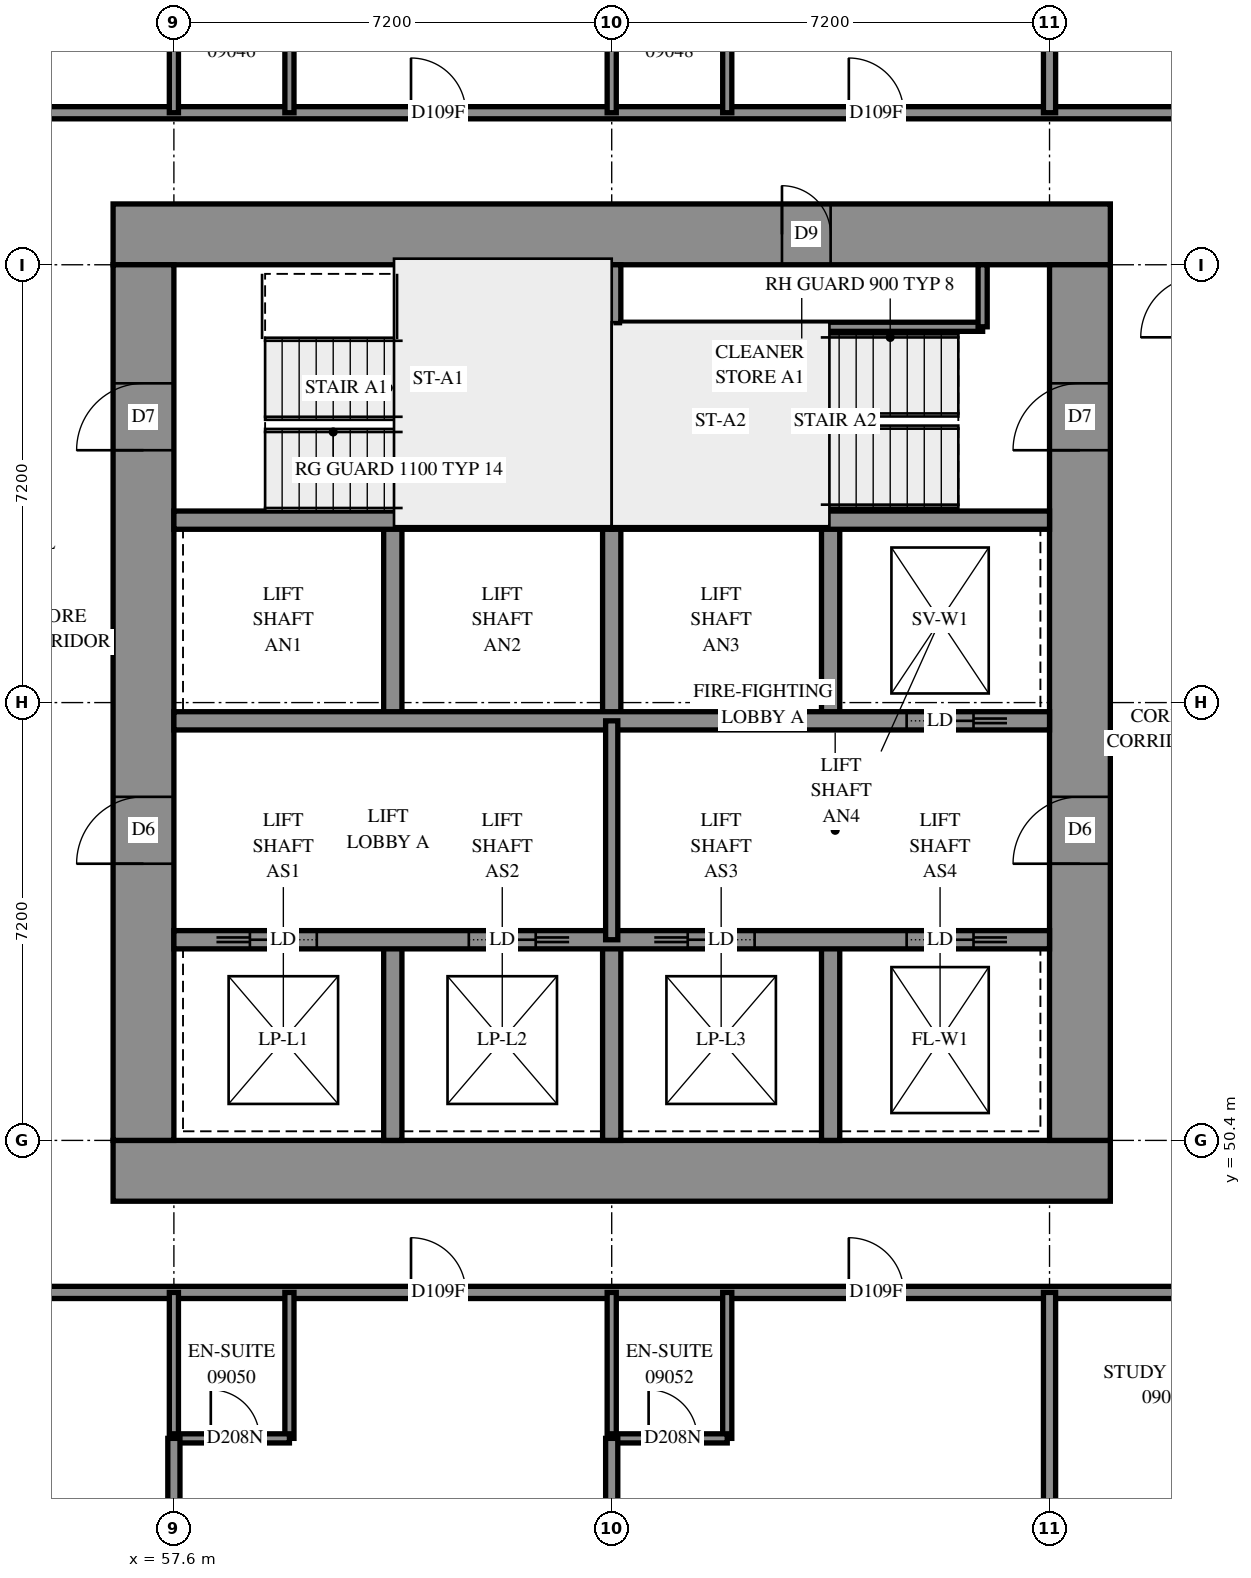
"""IFC4 building model, lengths in metres.
Left out: names, types, materials, properties, quantities, classifications, styles, units other than length and angle.
Written with IfcOpenShell. Run it as: python <this file> out.ifc"""

import sys

from ifc_helpers import new_model, si_unit, direction, frame, frame_2d, origin, place, context, subcontext, project, spatial, rectangle, extrude, element, fill, save


model = new_model("IFC4")
c1 = context("Model", 3, precision=1e-05, world=origin(), true_north=direction((0.0, 1.0)))
c2 = subcontext(c1, "Body", "Model", "MODEL_VIEW")
j1 = project(units=[si_unit("LENGTHUNIT", "METRE"), si_unit("PLANEANGLEUNIT", "RADIAN")], contexts=[c1])
p1 = place(None, origin())
s1 = spatial("IfcSite", under=j1, at=p1, CompositionType="ELEMENT")
p2 = place(p1, origin())
s2 = spatial("IfcBuilding", under=s1, at=p2, CompositionType="ELEMENT")
p3 = place(p2, frame((0.0, 0.0, 37.2)))
s3 = spatial("IfcBuildingStorey", under=s2, at=p3, CompositionType="ELEMENT", Elevation=37.2)
p4 = place(p3, frame((56.6, 49.9, -0.3), z_axis=(0.0, 0.0, 1.0), x_axis=(1.0, 0.0, 0.0)))
e1 = element("IfcWall", 1, at=p4, inside=s3, PredefinedType="SHEAR", context=c2, shape_type="SweptSolid", body=[
    extrude(rectangle(XDim=16.4, YDim=1.0, at=frame_2d((8.2, 0.0))), origin(), (0.0, 0.0, 1.0), 2.7),
])
p5 = place(p3, frame((56.6, 65.3, -0.3), z_axis=(0.0, 0.0, 1.0), x_axis=(1.0, 0.0, 0.0)))
e2 = element("IfcWall", 2, at=p5, inside=s3, PredefinedType="SHEAR", context=c2, shape_type="SweptSolid", body=[
    extrude(rectangle(XDim=16.4, YDim=1.0, at=frame_2d((8.2, 0.0))), origin(), (0.0, 0.0, 1.0), 2.7),
])
p6 = place(p5, frame((11.0, 0.0, 0.3)))
e3 = element("IfcOpeningElement", 3, at=p6, cuts=e2, PredefinedType="OPENING", context=c2, shape_type="SweptSolid", body=[
    extrude(rectangle(XDim=0.8, YDim=2.1, at=frame_2d((0.4, 1.05))), frame((0.0, 0.51, 0.0), z_axis=(0.0, -1.0, 0.0), x_axis=(1.0, 0.0, 0.0)), (0.0, 0.0, 1.0), 1.02),
])
p7 = place(p3, frame((57.1, 50.4, -0.3), z_axis=(0.0, 0.0, 1.0), x_axis=(0.0, 1.0, 0.0)))
e4 = element("IfcWall", 4, at=p7, inside=s3, PredefinedType="SHEAR", context=c2, shape_type="SweptSolid", body=[
    extrude(rectangle(XDim=14.4, YDim=1.0, at=frame_2d((7.2, 0.0))), origin(), (0.0, 0.0, 1.0), 2.7),
])
p8 = place(p7, frame((4.55, 0.0, 0.3)))
e5 = element("IfcOpeningElement", 5, at=p8, cuts=e4, PredefinedType="OPENING", context=c2, shape_type="SweptSolid", body=[
    extrude(rectangle(XDim=1.1, YDim=2.1, at=frame_2d((0.55, 1.05))), frame((0.0, 0.51, 0.0), z_axis=(0.0, -1.0, 0.0), x_axis=(1.0, 0.0, 0.0)), (0.0, 0.0, 1.0), 1.02),
])
p9 = place(p7, frame((11.35, 0.0, 0.3)))
e6 = element("IfcOpeningElement", 6, at=p9, cuts=e4, PredefinedType="OPENING", context=c2, shape_type="SweptSolid", body=[
    extrude(rectangle(XDim=1.1, YDim=2.1, at=frame_2d((0.55, 1.05))), frame((0.0, 0.51, 0.0), z_axis=(0.0, -1.0, 0.0), x_axis=(1.0, 0.0, 0.0)), (0.0, 0.0, 1.0), 1.02),
])
p10 = place(p3, frame((72.5, 50.4, -0.3), z_axis=(0.0, 0.0, 1.0), x_axis=(0.0, 1.0, 0.0)))
e7 = element("IfcWall", 7, at=p10, inside=s3, PredefinedType="SHEAR", context=c2, shape_type="SweptSolid", body=[
    extrude(rectangle(XDim=14.4, YDim=1.0, at=frame_2d((7.2, 0.0))), origin(), (0.0, 0.0, 1.0), 2.7),
])
p11 = place(p10, frame((4.55, 0.0, 0.3)))
e8 = element("IfcOpeningElement", 8, at=p11, cuts=e7, PredefinedType="OPENING", context=c2, shape_type="SweptSolid", body=[
    extrude(rectangle(XDim=1.1, YDim=2.1, at=frame_2d((0.55, 1.05))), frame((0.0, 0.51, 0.0), z_axis=(0.0, -1.0, 0.0), x_axis=(1.0, 0.0, 0.0)), (0.0, 0.0, 1.0), 1.02),
])
p12 = place(p10, frame((11.35, 0.0, 0.3)))
e9 = element("IfcOpeningElement", 9, at=p12, cuts=e7, PredefinedType="OPENING", context=c2, shape_type="SweptSolid", body=[
    extrude(rectangle(XDim=1.1, YDim=2.1, at=frame_2d((0.55, 1.05))), frame((0.0, 0.51, 0.0), z_axis=(0.0, -1.0, 0.0), x_axis=(1.0, 0.0, 0.0)), (0.0, 0.0, 1.0), 1.02),
])
for number, where, z_axis, x_axis in (
    (10, (61.2, 50.4, 0.0), (0.0, 0.0, 1.0), (0.0, 1.0, 0.0)),
    (11, (61.2, 57.3, 0.0), (0.0, 0.0, 1.0), (0.0, 1.0, 0.0)),
    (12, (64.8, 50.4, 0.0), (0.0, 0.0, 1.0), (0.0, 1.0, 0.0)),
    (13, (64.8, 57.3, 0.0), (0.0, 0.0, 1.0), (0.0, 1.0, 0.0)),
    (14, (68.4, 50.4, 0.0), (0.0, 0.0, 1.0), (0.0, 1.0, 0.0)),
    (15, (68.4, 57.3, 0.0), (0.0, 0.0, 1.0), (0.0, 1.0, 0.0)),
):
    element("IfcWall", number, at=place(p3, frame(where, z_axis=z_axis, x_axis=x_axis)), inside=s3, PredefinedType="SOLIDWALL", context=c2, shape_type="SweptSolid", body=[
        extrude(rectangle(XDim=3.3, YDim=0.3, at=frame_2d((1.65, 0.0))), origin(), (0.0, 0.0, 1.0), 3.1),
    ])
p13 = place(p3, frame((57.6, 53.7, 0.0), z_axis=(0.0, 0.0, 1.0), x_axis=(1.0, 0.0, 0.0)))
e16 = element("IfcWall", 16, at=p13, inside=s3, PredefinedType="SOLIDWALL", context=c2, shape_type="SweptSolid", body=[
    extrude(rectangle(XDim=14.4, YDim=0.3, at=frame_2d((7.2, 0.0))), origin(), (0.0, 0.0, 1.0), 3.1),
])
p14 = place(p13, frame((1.25, 0.0, 0.0)))
e17 = element("IfcOpeningElement", 17, at=p14, cuts=e16, PredefinedType="OPENING", context=c2, shape_type="SweptSolid", body=[
    extrude(rectangle(XDim=1.1, YDim=2.1, at=frame_2d((0.55, 1.05))), frame((0.0, 0.16, 0.0), z_axis=(0.0, -1.0, 0.0), x_axis=(1.0, 0.0, 0.0)), (0.0, 0.0, 1.0), 0.32),
])
p15 = place(p13, frame((4.85, 0.0, 0.0)))
e18 = element("IfcOpeningElement", 18, at=p15, cuts=e16, PredefinedType="OPENING", context=c2, shape_type="SweptSolid", body=[
    extrude(rectangle(XDim=1.1, YDim=2.1, at=frame_2d((0.55, 1.05))), frame((0.0, 0.16, 0.0), z_axis=(0.0, -1.0, 0.0), x_axis=(1.0, 0.0, 0.0)), (0.0, 0.0, 1.0), 0.32),
])
p16 = place(p13, frame((8.45, 0.0, 0.0)))
e19 = element("IfcOpeningElement", 19, at=p16, cuts=e16, PredefinedType="OPENING", context=c2, shape_type="SweptSolid", body=[
    extrude(rectangle(XDim=1.1, YDim=2.1, at=frame_2d((0.55, 1.05))), frame((0.0, 0.16, 0.0), z_axis=(0.0, -1.0, 0.0), x_axis=(1.0, 0.0, 0.0)), (0.0, 0.0, 1.0), 0.32),
])
p17 = place(p13, frame((12.05, 0.0, 0.0)))
e20 = element("IfcOpeningElement", 20, at=p17, cuts=e16, PredefinedType="OPENING", context=c2, shape_type="SweptSolid", body=[
    extrude(rectangle(XDim=1.1, YDim=2.1, at=frame_2d((0.55, 1.05))), frame((0.0, 0.16, 0.0), z_axis=(0.0, -1.0, 0.0), x_axis=(1.0, 0.0, 0.0)), (0.0, 0.0, 1.0), 0.32),
])
p18 = place(p3, frame((57.6, 57.3, 0.0), z_axis=(0.0, 0.0, 1.0), x_axis=(1.0, 0.0, 0.0)))
e21 = element("IfcWall", 21, at=p18, inside=s3, PredefinedType="SOLIDWALL", context=c2, shape_type="SweptSolid", body=[
    extrude(rectangle(XDim=14.4, YDim=0.3, at=frame_2d((7.2, 0.0))), origin(), (0.0, 0.0, 1.0), 3.1),
])
p19 = place(p18, frame((12.05, 0.0, 0.0)))
e22 = element("IfcOpeningElement", 22, at=p19, cuts=e21, PredefinedType="OPENING", context=c2, shape_type="SweptSolid", body=[
    extrude(rectangle(XDim=1.1, YDim=2.1, at=frame_2d((0.55, 1.05))), frame((0.0, 0.16, 0.0), z_axis=(0.0, -1.0, 0.0), x_axis=(1.0, 0.0, 0.0)), (0.0, 0.0, 1.0), 0.32),
])
for number, where, z_axis, x_axis in (
    (23, (57.6, 60.6, 0.0), (0.0, 0.0, 1.0), (1.0, 0.0, 0.0)),
    (24, (64.8, 60.6, 0.0), (0.0, 0.0, 1.0), (1.0, 0.0, 0.0)),
):
    element("IfcWall", number, at=place(p3, frame(where, z_axis=z_axis, x_axis=x_axis)), inside=s3, PredefinedType="SOLIDWALL", context=c2, shape_type="SweptSolid", body=[
        extrude(rectangle(XDim=7.2, YDim=0.3, at=frame_2d((3.6, 0.0))), origin(), (0.0, 0.0, 1.0), 3.1),
    ])
p20 = place(p3, frame((64.8, 60.6, 0.0), z_axis=(0.0, 0.0, 1.0), x_axis=(0.0, 1.0, 0.0)))
e25 = element("IfcWall", 25, at=p20, inside=s3, PredefinedType="SOLIDWALL", context=c2, shape_type="SweptSolid", body=[
    extrude(rectangle(XDim=4.2, YDim=0.3, at=frame_2d((2.1, 0.0))), origin(), (0.0, 0.0, 1.0), 3.1),
])
p21 = place(p3, frame((64.95, 63.78, 0.0), z_axis=(0.0, 0.0, 1.0), x_axis=(1.0, 0.0, 0.0)))
e26 = element("IfcWall", 26, at=p21, inside=s3, PredefinedType="PARTITIONING", context=c2, shape_type="SweptSolid", body=[
    extrude(rectangle(XDim=5.95, YDim=0.15, at=frame_2d((2.975, 0.0))), origin(), (0.0, 0.0, 1.0), 3.1),
])
p22 = place(p3, frame((70.9, 63.78, 0.0), z_axis=(0.0, 0.0, 1.0), x_axis=(0.0, 1.0, 0.0)))
e27 = element("IfcWall", 27, at=p22, inside=s3, PredefinedType="PARTITIONING", context=c2, shape_type="SweptSolid", body=[
    extrude(rectangle(XDim=1.02, YDim=0.15, at=frame_2d((0.51, 0.0))), origin(), (0.0, 0.0, 1.0), 3.1),
])
p23 = place(p3, frame((64.8, 53.7, 0.0), z_axis=(0.0, 0.0, 1.0), x_axis=(0.0, 1.0, 0.0)))
e28 = element("IfcWall", 28, at=p23, inside=s3, PredefinedType="PARTITIONING", context=c2, shape_type="SweptSolid", body=[
    extrude(rectangle(XDim=3.6, YDim=0.2, at=frame_2d((1.8, 0.0))), origin(), (0.0, 0.0, 1.0), 3.1),
])
p24 = place(p3, frame((55.1, 67.3, 0.0), z_axis=(0.0, 0.0, 1.0), x_axis=(1.0, 0.0, 0.0)))
e29 = element("IfcWall", 29, at=p24, inside=s3, PredefinedType="PARTITIONING", context=c2, shape_type="SweptSolid", body=[
    extrude(rectangle(XDim=19.4, YDim=0.2, at=frame_2d((9.7, 0.0))), origin(), (0.0, 0.0, 1.0), 3.1),
])
p25 = place(p24, frame((6.399, 0.0, 0.0)))
e30 = element("IfcOpeningElement", 30, at=p25, cuts=e29, PredefinedType="OPENING", context=c2, shape_type="SweptSolid", body=[
    extrude(rectangle(XDim=0.9, YDim=2.1, at=frame_2d((0.45, 1.05))), frame((0.0, 0.11, 0.0), z_axis=(0.0, -1.0, 0.0), x_axis=(1.0, 0.0, 0.0)), (0.0, 0.0, 1.0), 0.22),
])
p26 = place(p24, frame((13.599, 0.0, 0.0)))
e31 = element("IfcOpeningElement", 31, at=p26, cuts=e29, PredefinedType="OPENING", context=c2, shape_type="SweptSolid", body=[
    extrude(rectangle(XDim=0.9, YDim=2.1, at=frame_2d((0.45, 1.05))), frame((0.0, 0.11, 0.0), z_axis=(0.0, -1.0, 0.0), x_axis=(1.0, 0.0, 0.0)), (0.0, 0.0, 1.0), 0.22),
])
p27 = place(p3, frame((55.1, 47.9, 0.0), z_axis=(0.0, 0.0, 1.0), x_axis=(1.0, 0.0, 0.0)))
e32 = element("IfcWall", 32, at=p27, inside=s3, PredefinedType="PARTITIONING", context=c2, shape_type="SweptSolid", body=[
    extrude(rectangle(XDim=19.204, YDim=0.2, at=frame_2d((9.602, 0.0))), origin(), (0.0, 0.0, 1.0), 3.1),
])
p28 = place(p27, frame((6.399, 0.0, 0.0)))
e33 = element("IfcOpeningElement", 33, at=p28, cuts=e32, PredefinedType="OPENING", context=c2, shape_type="SweptSolid", body=[
    extrude(rectangle(XDim=0.9, YDim=2.1, at=frame_2d((0.45, 1.05))), frame((0.0, 0.11, 0.0), z_axis=(0.0, -1.0, 0.0), x_axis=(1.0, 0.0, 0.0)), (0.0, 0.0, 1.0), 0.22),
])
p29 = place(p27, frame((13.599, 0.0, 0.0)))
e34 = element("IfcOpeningElement", 34, at=p29, cuts=e32, PredefinedType="OPENING", context=c2, shape_type="SweptSolid", body=[
    extrude(rectangle(XDim=0.9, YDim=2.1, at=frame_2d((0.45, 1.05))), frame((0.0, 0.11, 0.0), z_axis=(0.0, -1.0, 0.0), x_axis=(1.0, 0.0, 0.0)), (0.0, 0.0, 1.0), 0.22),
])
for number, where, z_axis, x_axis in (
    (35, (72.0, 67.3, 0.0), (0.0, 0.0, 1.0), (0.0, 1.0, 0.0)),
    (36, (72.0, 43.8, 0.0), (0.0, 0.0, 1.0), (0.0, 1.0, 0.0)),
):
    element("IfcWall", number, at=place(p3, frame(where, z_axis=z_axis, x_axis=x_axis)), inside=s3, PredefinedType="PARTITIONING", context=c2, shape_type="SweptSolid", body=[
        extrude(rectangle(XDim=4.1, YDim=0.2, at=frame_2d((2.05, 0.0))), origin(), (0.0, 0.0, 1.0), 3.1),
    ])
for number, where, z_axis, x_axis in (
    (37, (59.5, 67.3, 0.0), (0.0, 0.0, 1.0), (0.0, 1.0, 0.0)),
    (38, (57.6, 67.3, 0.0), (0.0, 0.0, 1.0), (0.0, 1.0, 0.0)),
    (39, (66.7, 67.3, 0.0), (0.0, 0.0, 1.0), (0.0, 1.0, 0.0)),
    (40, (64.8, 67.3, 0.0), (0.0, 0.0, 1.0), (0.0, 1.0, 0.0)),
    (41, (59.5, 45.5, 0.0), (0.0, 0.0, 1.0), (0.0, 1.0, 0.0)),
    (42, (57.6, 45.5, 0.0), (0.0, 0.0, 1.0), (0.0, 1.0, 0.0)),
    (43, (66.7, 45.5, 0.0), (0.0, 0.0, 1.0), (0.0, 1.0, 0.0)),
    (44, (64.8, 45.5, 0.0), (0.0, 0.0, 1.0), (0.0, 1.0, 0.0)),
):
    element("IfcWall", number, at=place(p3, frame(where, z_axis=z_axis, x_axis=x_axis)), inside=s3, PredefinedType="PARTITIONING", context=c2, shape_type="SweptSolid", body=[
        extrude(rectangle(XDim=2.4, YDim=0.15, at=frame_2d((1.2, 0.0))), origin(), (0.0, 0.0, 1.0), 3.1),
    ])
p30 = place(p3, frame((64.8, 45.5, 0.0), z_axis=(0.0, 0.0, 1.0), x_axis=(1.0, 0.0, 0.0)))
e45 = element("IfcWall", 45, at=p30, inside=s3, PredefinedType="PARTITIONING", context=c2, shape_type="SweptSolid", body=[
    extrude(rectangle(XDim=1.9, YDim=0.15, at=frame_2d((0.95, 0.0))), origin(), (0.0, 0.0, 1.0), 3.1),
])
p31 = place(p30, frame((0.607, 0.0, 0.0)))
e46 = element("IfcOpeningElement", 46, at=p31, cuts=e45, PredefinedType="OPENING", context=c2, shape_type="SweptSolid", body=[
    extrude(rectangle(XDim=0.8, YDim=2.1, at=frame_2d((0.4, 1.05))), frame((0.0, 0.085, 0.0), z_axis=(0.0, -1.0, 0.0), x_axis=(1.0, 0.0, 0.0)), (0.0, 0.0, 1.0), 0.17),
])
p32 = place(p3, frame((57.6, 45.5, 0.0), z_axis=(0.0, 0.0, 1.0), x_axis=(1.0, 0.0, 0.0)))
e47 = element("IfcWall", 47, at=p32, inside=s3, PredefinedType="PARTITIONING", context=c2, shape_type="SweptSolid", body=[
    extrude(rectangle(XDim=1.9, YDim=0.15, at=frame_2d((0.95, 0.0))), origin(), (0.0, 0.0, 1.0), 3.1),
])
p33 = place(p32, frame((0.607, 0.0, 0.0)))
e48 = element("IfcOpeningElement", 48, at=p33, cuts=e47, PredefinedType="OPENING", context=c2, shape_type="SweptSolid", body=[
    extrude(rectangle(XDim=0.8, YDim=2.1, at=frame_2d((0.4, 1.05))), frame((0.0, 0.085, 0.0), z_axis=(0.0, -1.0, 0.0), x_axis=(1.0, 0.0, 0.0)), (0.0, 0.0, 1.0), 0.17),
])
for number, where, z_axis, x_axis in (
    (49, (57.6, 43.8, 0.0), (0.0, 0.0, 1.0), (0.0, 1.0, 0.0)),
    (50, (64.8, 43.8, 0.0), (0.0, 0.0, 1.0), (0.0, 1.0, 0.0)),
):
    element("IfcWall", number, at=place(p3, frame(where, z_axis=z_axis, x_axis=x_axis)), inside=s3, PredefinedType="PARTITIONING", context=c2, shape_type="SweptSolid", body=[
        extrude(rectangle(XDim=1.7, YDim=0.2, at=frame_2d((0.85, 0.0))), origin(), (0.0, 0.0, 1.0), 3.1),
    ])
p34 = place(p6, origin())
e51 = element("IfcDoor", 51, at=p34, inside=s3, OperationType="SINGLE_SWING_RIGHT", PredefinedType="DOOR", context=c2, shape_type="SweptSolid", body=[
    extrude(rectangle(XDim=0.8, YDim=2.1, at=frame_2d((0.4, 1.05))), frame((0.0, -0.44, 0.0), z_axis=(0.0, -1.0, 0.0), x_axis=(1.0, 0.0, 0.0)), (0.0, 0.0, 1.0), 0.05),
])
fill(e3, e51)
p35 = place(p8, origin())
e52 = element("IfcDoor", 52, at=p35, inside=s3, OperationType="DOUBLE_DOOR_SINGLE_SWING", PredefinedType="DOOR", context=c2, shape_type="SweptSolid", body=[
    extrude(rectangle(XDim=1.1, YDim=2.1, at=frame_2d((0.55, 1.05))), frame((0.0, 0.025, 0.0), z_axis=(0.0, -1.0, 0.0), x_axis=(1.0, 0.0, 0.0)), (0.0, 0.0, 1.0), 0.05),
])
fill(e5, e52)
p36 = place(p11, origin())
e53 = element("IfcDoor", 53, at=p36, inside=s3, OperationType="DOUBLE_DOOR_SINGLE_SWING", PredefinedType="DOOR", context=c2, shape_type="SweptSolid", body=[
    extrude(rectangle(XDim=1.1, YDim=2.1, at=frame_2d((0.55, 1.05))), frame((0.0, 0.025, 0.0), z_axis=(0.0, -1.0, 0.0), x_axis=(1.0, 0.0, 0.0)), (0.0, 0.0, 1.0), 0.05),
])
fill(e8, e53)
p37 = place(p9, origin())
e54 = element("IfcDoor", 54, at=p37, inside=s3, OperationType="SINGLE_SWING_LEFT", PredefinedType="DOOR", context=c2, shape_type="SweptSolid", body=[
    extrude(rectangle(XDim=1.1, YDim=2.1, at=frame_2d((0.55, 1.05))), frame((0.0, 0.025, 0.0), z_axis=(0.0, -1.0, 0.0), x_axis=(1.0, 0.0, 0.0)), (0.0, 0.0, 1.0), 0.05),
])
fill(e6, e54)
p38 = place(p12, origin())
e55 = element("IfcDoor", 55, at=p38, inside=s3, OperationType="SINGLE_SWING_RIGHT", PredefinedType="DOOR", context=c2, shape_type="SweptSolid", body=[
    extrude(rectangle(XDim=1.1, YDim=2.1, at=frame_2d((0.55, 1.05))), frame((0.0, 0.025, 0.0), z_axis=(0.0, -1.0, 0.0), x_axis=(1.0, 0.0, 0.0)), (0.0, 0.0, 1.0), 0.05),
])
fill(e9, e55)
p39 = place(p14, origin())
e56 = element("IfcDoor", 56, at=p39, inside=s3, OperationType="SLIDING_TO_LEFT", PredefinedType="DOOR", context=c2, shape_type="SweptSolid", body=[
    extrude(rectangle(XDim=1.1, YDim=2.1, at=frame_2d((0.55, 1.05))), frame((0.0, 0.025, 0.0), z_axis=(0.0, -1.0, 0.0), x_axis=(1.0, 0.0, 0.0)), (0.0, 0.0, 1.0), 0.05),
])
fill(e17, e56)
p40 = place(p15, origin())
e57 = element("IfcDoor", 57, at=p40, inside=s3, OperationType="SLIDING_TO_RIGHT", PredefinedType="DOOR", context=c2, shape_type="SweptSolid", body=[
    extrude(rectangle(XDim=1.1, YDim=2.1, at=frame_2d((0.55, 1.05))), frame((0.0, 0.025, 0.0), z_axis=(0.0, -1.0, 0.0), x_axis=(1.0, 0.0, 0.0)), (0.0, 0.0, 1.0), 0.05),
])
fill(e18, e57)
p41 = place(p16, origin())
e58 = element("IfcDoor", 58, at=p41, inside=s3, OperationType="SLIDING_TO_LEFT", PredefinedType="DOOR", context=c2, shape_type="SweptSolid", body=[
    extrude(rectangle(XDim=1.1, YDim=2.1, at=frame_2d((0.55, 1.05))), frame((0.0, 0.025, 0.0), z_axis=(0.0, -1.0, 0.0), x_axis=(1.0, 0.0, 0.0)), (0.0, 0.0, 1.0), 0.05),
])
fill(e19, e58)
p42 = place(p17, origin())
e59 = element("IfcDoor", 59, at=p42, inside=s3, OperationType="SLIDING_TO_RIGHT", PredefinedType="DOOR", context=c2, shape_type="SweptSolid", body=[
    extrude(rectangle(XDim=1.1, YDim=2.1, at=frame_2d((0.55, 1.05))), frame((0.0, 0.025, 0.0), z_axis=(0.0, -1.0, 0.0), x_axis=(1.0, 0.0, 0.0)), (0.0, 0.0, 1.0), 0.05),
])
fill(e20, e59)
p43 = place(p19, origin())
e60 = element("IfcDoor", 60, at=p43, inside=s3, OperationType="SLIDING_TO_RIGHT", PredefinedType="DOOR", context=c2, shape_type="SweptSolid", body=[
    extrude(rectangle(XDim=1.1, YDim=2.1, at=frame_2d((0.55, 1.05))), frame((0.0, 0.025, 0.0), z_axis=(0.0, -1.0, 0.0), x_axis=(1.0, 0.0, 0.0)), (0.0, 0.0, 1.0), 0.05),
])
fill(e22, e60)
p44 = place(p25, origin())
e61 = element("IfcDoor", 61, at=p44, inside=s3, OperationType="SINGLE_SWING_RIGHT", PredefinedType="DOOR", context=c2, shape_type="SweptSolid", body=[
    extrude(rectangle(XDim=0.9, YDim=2.1, at=frame_2d((0.45, 1.05))), frame((0.0, 0.025, 0.0), z_axis=(0.0, -1.0, 0.0), x_axis=(1.0, 0.0, 0.0)), (0.0, 0.0, 1.0), 0.05),
])
fill(e30, e61)
p45 = place(p26, origin())
e62 = element("IfcDoor", 62, at=p45, inside=s3, OperationType="SINGLE_SWING_RIGHT", PredefinedType="DOOR", context=c2, shape_type="SweptSolid", body=[
    extrude(rectangle(XDim=0.9, YDim=2.1, at=frame_2d((0.45, 1.05))), frame((0.0, 0.025, 0.0), z_axis=(0.0, -1.0, 0.0), x_axis=(1.0, 0.0, 0.0)), (0.0, 0.0, 1.0), 0.05),
])
fill(e31, e62)
p46 = place(p28, origin())
e63 = element("IfcDoor", 63, at=p46, inside=s3, OperationType="SINGLE_SWING_LEFT", PredefinedType="DOOR", context=c2, shape_type="SweptSolid", body=[
    extrude(rectangle(XDim=0.9, YDim=2.1, at=frame_2d((0.45, 1.05))), frame((0.0, 0.025, 0.0), z_axis=(0.0, -1.0, 0.0), x_axis=(1.0, 0.0, 0.0)), (0.0, 0.0, 1.0), 0.05),
])
fill(e33, e63)
p47 = place(p33, origin())
e64 = element("IfcDoor", 64, at=p47, inside=s3, OperationType="SINGLE_SWING_RIGHT", PredefinedType="DOOR", context=c2, shape_type="SweptSolid", body=[
    extrude(rectangle(XDim=0.8, YDim=2.1, at=frame_2d((0.4, 1.05))), frame((0.0, 0.025, 0.0), z_axis=(0.0, -1.0, 0.0), x_axis=(1.0, 0.0, 0.0)), (0.0, 0.0, 1.0), 0.05),
])
fill(e48, e64)
p48 = place(p29, origin())
e65 = element("IfcDoor", 65, at=p48, inside=s3, OperationType="SINGLE_SWING_LEFT", PredefinedType="DOOR", context=c2, shape_type="SweptSolid", body=[
    extrude(rectangle(XDim=0.9, YDim=2.1, at=frame_2d((0.45, 1.05))), frame((0.0, 0.025, 0.0), z_axis=(0.0, -1.0, 0.0), x_axis=(1.0, 0.0, 0.0)), (0.0, 0.0, 1.0), 0.05),
])
fill(e34, e65)
p49 = place(p31, origin())
e66 = element("IfcDoor", 66, at=p49, inside=s3, OperationType="SINGLE_SWING_RIGHT", PredefinedType="DOOR", context=c2, shape_type="SweptSolid", body=[
    extrude(rectangle(XDim=0.8, YDim=2.1, at=frame_2d((0.4, 1.05))), frame((0.0, 0.025, 0.0), z_axis=(0.0, -1.0, 0.0), x_axis=(1.0, 0.0, 0.0)), (0.0, 0.0, 1.0), 0.05),
])
fill(e46, e66)
save(model, sys.argv[1])
